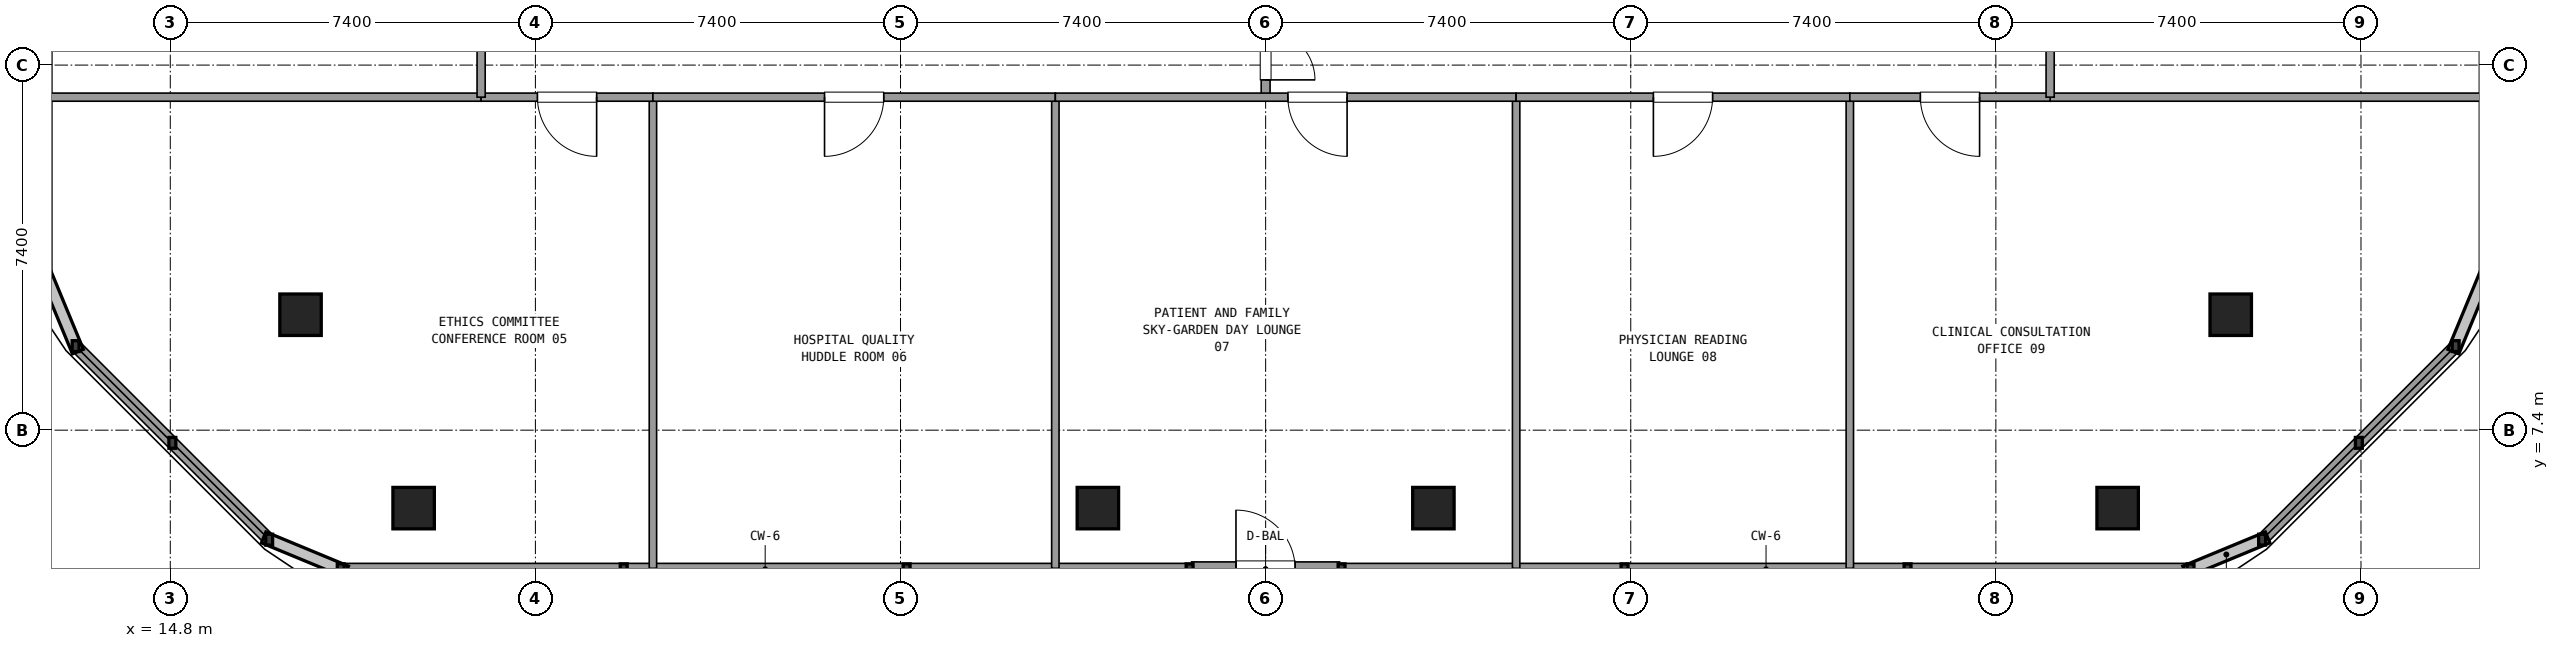
"""IFC4 building model, lengths in metres.
Left out: names, types, materials, properties, quantities, classifications, styles, units other than length and angle.
Written with IfcOpenShell. Run it as: python <this file> out.ifc"""

import sys

from ifc_helpers import new_model, si_unit, direction, frame, frame_2d, origin, origin_2d, place, context, subcontext, project, spatial, rectangle, extrude, element, fill, save


model = new_model("IFC4")
c1 = context("Model", 3, precision=1e-05, world=origin(), true_north=direction((0.0, 1.0)))
c2 = subcontext(c1, "Body", "Model", "MODEL_VIEW")
j1 = project(units=[si_unit("LENGTHUNIT", "METRE"), si_unit("PLANEANGLEUNIT", "RADIAN")], contexts=[c1])
p1 = place(None, origin())
s1 = spatial("IfcSite", under=j1, at=p1, CompositionType="ELEMENT")
p2 = place(p1, origin())
s2 = spatial("IfcBuilding", under=s1, at=p2, CompositionType="ELEMENT")
p3 = place(p2, frame((0.0, 0.0, 278.82)))
s3 = spatial("IfcBuildingStorey", under=s2, at=p3, CompositionType="ELEMENT", Elevation=278.82)
for number, where, z_axis, x_axis in (
    (1, (17.44, 9.74, 0.0), (0.0, 0.0, 1.0), (1.0, 0.0, 0.0)),
    (2, (19.732, 5.82, 0.0), (0.0, 0.0, 1.0), (1.0, 0.0, 0.0)),
    (3, (33.6, 5.82, 0.0), (0.0, 0.0, 1.0), (1.0, 0.0, 0.0)),
    (4, (40.4, 5.82, 0.0), (0.0, 0.0, 1.0), (1.0, 0.0, 0.0)),
    (5, (54.268, 5.82, 0.0), (0.0, 0.0, 1.0), (1.0, 0.0, 0.0)),
    (6, (56.56, 9.74, 0.0), (0.0, 0.0, 1.0), (1.0, 0.0, 0.0)),
):
    element("IfcColumn", number, at=place(p3, frame(where, z_axis=z_axis, x_axis=x_axis)), inside=s3, PredefinedType="COLUMN", context=c2, shape_type="SweptSolid", body=[
        extrude(rectangle(XDim=0.84, YDim=0.84, at=origin_2d()), origin(), (0.0, 0.0, 1.0), 3.6),
    ])
p4 = place(p3, frame((35.499, 4.58, 0.0), z_axis=(0.0, 0.0, 1.0), x_axis=(1.0, 0.0, 0.0)))
e7 = element("IfcWall", 7, at=p4, inside=s3, PredefinedType="SOLIDWALL", context=c2, shape_type="SweptSolid", body=[
    extrude(rectangle(XDim=3.0, YDim=0.3, at=frame_2d((1.5, 0.0))), origin(), (0.0, 0.0, 1.0), 2.69),
])
p5 = place(p4, frame((0.9, 0.0, 0.0)))
e8 = element("IfcOpeningElement", 8, at=p5, cuts=e7, PredefinedType="OPENING", context=c2, shape_type="SweptSolid", body=[
    extrude(rectangle(XDim=1.2, YDim=2.2, at=frame_2d((0.6, 1.1))), frame((0.0, 0.16, 0.0), z_axis=(0.0, -1.0, 0.0), x_axis=(1.0, 0.0, 0.0)), (0.0, 0.0, 1.0), 0.32),
])
p6 = place(p3, frame((18.255, 4.58, 0.0), z_axis=(0.0, 0.0, 1.0), x_axis=(1.0, 0.0, 0.0)))
e9 = element("IfcWall", 9, at=p6, inside=s3, PredefinedType="SOLIDWALL", context=c2, shape_type="SweptSolid", body=[
    extrude(rectangle(XDim=17.204, YDim=0.24, at=frame_2d((8.602, 0.0))), origin(), (0.0, 0.0, 1.0), 0.85),
])
p7 = place(p3, frame((38.539, 4.58, 0.0), z_axis=(0.0, 0.0, 1.0), x_axis=(1.0, 0.0, 0.0)))
e10 = element("IfcWall", 10, at=p7, inside=s3, PredefinedType="SOLIDWALL", context=c2, shape_type="SweptSolid", body=[
    extrude(rectangle(XDim=17.206, YDim=0.24, at=frame_2d((8.603, 0.0))), origin(), (0.0, 0.0, 1.0), 0.85),
])
p8 = place(p3, frame((57.196, 5.181, 0.0), z_axis=(0.0, 0.0, 1.0), x_axis=(0.707084777957, 0.707128783731, 0.0)))
e11 = element("IfcWall", 11, at=p8, inside=s3, PredefinedType="SOLIDWALL", context=c2, shape_type="SweptSolid", body=[
    extrude(rectangle(XDim=5.548, YDim=0.24, at=frame_2d((2.774, 0.0))), origin(), (0.0, 0.0, 1.0), 0.85),
])
p9 = place(p3, frame((61.72, 10.555, 0.0), z_axis=(0.0, 0.0, 1.0), x_axis=(0.0, 1.0, 0.0)))
e12 = element("IfcWall", 12, at=p9, inside=s3, PredefinedType="SOLIDWALL", context=c2, shape_type="SweptSolid", body=[
    extrude(rectangle(XDim=30.69, YDim=0.24, at=frame_2d((15.345, 0.0))), origin(), (0.0, 0.0, 1.0), 0.85),
])
p10 = place(p3, frame((12.28, 24.36, 0.0), z_axis=(0.0, 0.0, 1.0), x_axis=(0.0, -1.0, 0.0)))
e13 = element("IfcWall", 13, at=p10, inside=s3, PredefinedType="SOLIDWALL", context=c2, shape_type="SweptSolid", body=[
    extrude(rectangle(XDim=13.805, YDim=0.24, at=frame_2d((6.903, 0.0))), origin(), (0.0, 0.0, 1.0), 0.85),
])
p11 = place(p3, frame((12.881, 9.104, 0.0), z_axis=(0.0, 0.0, 1.0), x_axis=(0.707084777957, -0.707128783731, 0.0)))
e14 = element("IfcWall", 14, at=p11, inside=s3, PredefinedType="SOLIDWALL", context=c2, shape_type="SweptSolid", body=[
    extrude(rectangle(XDim=5.548, YDim=0.24, at=frame_2d((2.774, 0.0))), origin(), (0.0, 0.0, 1.0), 0.85),
])
p12 = place(p3, frame((37.0, 14.15, 0.0), z_axis=(0.0, 0.0, 1.0), x_axis=(0.0, 1.0, 0.0)))
e15 = element("IfcWall", 15, at=p12, inside=s3, PredefinedType="PARTITIONING", context=c2, shape_type="SweptSolid", body=[
    extrude(rectangle(XDim=2.7, YDim=0.18, at=frame_2d((1.35, 0.0))), origin(), (0.0, 0.0, 1.0), 2.61),
])
p13 = place(p12, frame((0.35, 0.0, 0.0)))
e16 = element("IfcOpeningElement", 16, at=p13, cuts=e15, PredefinedType="OPENING", context=c2, shape_type="SweptSolid", body=[
    extrude(rectangle(XDim=2.0, YDim=2.2, at=frame_2d((1.0, 1.1))), frame((0.0, 0.1, 0.0), z_axis=(0.0, -1.0, 0.0), x_axis=(1.0, 0.0, 0.0)), (0.0, 0.0, 1.0), 0.2),
])
for number, where, z_axis, x_axis in (
    (17, (12.3, 14.15, 0.0), (0.0, 0.0, 1.0), (1.0, 0.0, 0.0)),
    (18, (52.9, 14.15, 0.0), (0.0, 0.0, 1.0), (1.0, 0.0, 0.0)),
):
    element("IfcWall", number, at=place(p3, frame(where, z_axis=z_axis, x_axis=x_axis)), inside=s3, PredefinedType="PARTITIONING", context=c2, shape_type="SweptSolid", body=[
        extrude(rectangle(XDim=8.8, YDim=0.165, at=frame_2d((4.4, 0.0))), origin(), (0.0, 0.0, 1.0), 2.61),
    ])
p14 = place(p3, frame((24.582, 14.15, 0.0), z_axis=(0.0, 0.0, 1.0), x_axis=(0.0, -1.0, 0.0)))
e19 = element("IfcWall", 19, at=p14, inside=s3, PredefinedType="PARTITIONING", context=c2, shape_type="SweptSolid", body=[
    extrude(rectangle(XDim=9.55, YDim=0.15, at=frame_2d((4.775, 0.0))), origin(), (0.0, 0.0, 1.0), 2.61),
])
p15 = place(p3, frame((21.1, 14.15, 0.0), z_axis=(0.0, 0.0, 1.0), x_axis=(1.0, 0.0, 0.0)))
e20 = element("IfcWall", 20, at=p15, inside=s3, PredefinedType="PARTITIONING", context=c2, shape_type="SweptSolid", body=[
    extrude(rectangle(XDim=3.482, YDim=0.165, at=frame_2d((1.741, 0.0))), origin(), (0.0, 0.0, 1.0), 2.61),
])
p16 = place(p15, frame((1.141, 0.0, 0.0)))
e21 = element("IfcOpeningElement", 21, at=p16, cuts=e20, PredefinedType="OPENING", context=c2, shape_type="SweptSolid", body=[
    extrude(rectangle(XDim=1.2, YDim=2.15, at=frame_2d((0.6, 1.075))), frame((0.0, 0.093, 0.0), z_axis=(0.0, -1.0, 0.0), x_axis=(1.0, 0.0, 0.0)), (0.0, 0.0, 1.0), 0.185),
])
p17 = place(p3, frame((32.738, 14.15, 0.0), z_axis=(0.0, 0.0, 1.0), x_axis=(0.0, -1.0, 0.0)))
e22 = element("IfcWall", 22, at=p17, inside=s3, PredefinedType="PARTITIONING", context=c2, shape_type="SweptSolid", body=[
    extrude(rectangle(XDim=9.55, YDim=0.15, at=frame_2d((4.775, 0.0))), origin(), (0.0, 0.0, 1.0), 2.61),
])
p18 = place(p3, frame((24.582, 14.15, 0.0), z_axis=(0.0, 0.0, 1.0), x_axis=(1.0, 0.0, 0.0)))
e23 = element("IfcWall", 23, at=p18, inside=s3, PredefinedType="PARTITIONING", context=c2, shape_type="SweptSolid", body=[
    extrude(rectangle(XDim=8.156, YDim=0.165, at=frame_2d((4.078, 0.0))), origin(), (0.0, 0.0, 1.0), 2.61),
])
p19 = place(p18, frame((3.478, 0.0, 0.0)))
e24 = element("IfcOpeningElement", 24, at=p19, cuts=e23, PredefinedType="OPENING", context=c2, shape_type="SweptSolid", body=[
    extrude(rectangle(XDim=1.2, YDim=2.15, at=frame_2d((0.6, 1.075))), frame((0.0, 0.093, 0.0), z_axis=(0.0, -1.0, 0.0), x_axis=(1.0, 0.0, 0.0)), (0.0, 0.0, 1.0), 0.185),
])
p20 = place(p3, frame((42.077, 14.15, 0.0), z_axis=(0.0, 0.0, 1.0), x_axis=(0.0, -1.0, 0.0)))
e25 = element("IfcWall", 25, at=p20, inside=s3, PredefinedType="PARTITIONING", context=c2, shape_type="SweptSolid", body=[
    extrude(rectangle(XDim=9.55, YDim=0.15, at=frame_2d((4.775, 0.0))), origin(), (0.0, 0.0, 1.0), 2.61),
])
p21 = place(p3, frame((32.738, 14.15, 0.0), z_axis=(0.0, 0.0, 1.0), x_axis=(1.0, 0.0, 0.0)))
e26 = element("IfcWall", 26, at=p21, inside=s3, PredefinedType="PARTITIONING", context=c2, shape_type="SweptSolid", body=[
    extrude(rectangle(XDim=9.339, YDim=0.165, at=frame_2d((4.669, 0.0))), origin(), (0.0, 0.0, 1.0), 2.61),
])
p22 = place(p21, frame((4.713, 0.0, 0.0)))
e27 = element("IfcOpeningElement", 27, at=p22, cuts=e26, PredefinedType="OPENING", context=c2, shape_type="SweptSolid", body=[
    extrude(rectangle(XDim=1.2, YDim=2.15, at=frame_2d((0.6, 1.075))), frame((0.0, 0.093, 0.0), z_axis=(0.0, -1.0, 0.0), x_axis=(1.0, 0.0, 0.0)), (0.0, 0.0, 1.0), 0.185),
])
p23 = place(p3, frame((48.84, 14.15, 0.0), z_axis=(0.0, 0.0, 1.0), x_axis=(0.0, -1.0, 0.0)))
e28 = element("IfcWall", 28, at=p23, inside=s3, PredefinedType="PARTITIONING", context=c2, shape_type="SweptSolid", body=[
    extrude(rectangle(XDim=9.55, YDim=0.15, at=frame_2d((4.775, 0.0))), origin(), (0.0, 0.0, 1.0), 2.61),
])
p24 = place(p3, frame((42.077, 14.15, 0.0), z_axis=(0.0, 0.0, 1.0), x_axis=(1.0, 0.0, 0.0)))
e29 = element("IfcWall", 29, at=p24, inside=s3, PredefinedType="PARTITIONING", context=c2, shape_type="SweptSolid", body=[
    extrude(rectangle(XDim=6.763, YDim=0.165, at=frame_2d((3.382, 0.0))), origin(), (0.0, 0.0, 1.0), 2.61),
])
p25 = place(p24, frame((2.782, 0.0, 0.0)))
e30 = element("IfcOpeningElement", 30, at=p25, cuts=e29, PredefinedType="OPENING", context=c2, shape_type="SweptSolid", body=[
    extrude(rectangle(XDim=1.2, YDim=2.15, at=frame_2d((0.6, 1.075))), frame((0.0, 0.093, 0.0), z_axis=(0.0, -1.0, 0.0), x_axis=(1.0, 0.0, 0.0)), (0.0, 0.0, 1.0), 0.185),
])
p26 = place(p3, frame((48.84, 14.15, 0.0), z_axis=(0.0, 0.0, 1.0), x_axis=(1.0, 0.0, 0.0)))
e31 = element("IfcWall", 31, at=p26, inside=s3, PredefinedType="PARTITIONING", context=c2, shape_type="SweptSolid", body=[
    extrude(rectangle(XDim=4.06, YDim=0.165, at=frame_2d((2.03, 0.0))), origin(), (0.0, 0.0, 1.0), 2.61),
])
p27 = place(p26, frame((1.43, 0.0, 0.0)))
e32 = element("IfcOpeningElement", 32, at=p27, cuts=e31, PredefinedType="OPENING", context=c2, shape_type="SweptSolid", body=[
    extrude(rectangle(XDim=1.2, YDim=2.15, at=frame_2d((0.6, 1.075))), frame((0.0, 0.093, 0.0), z_axis=(0.0, -1.0, 0.0), x_axis=(1.0, 0.0, 0.0)), (0.0, 0.0, 1.0), 0.185),
])
p28 = place(p3, frame((21.1, 14.15, 0.0), z_axis=(0.0, 0.0, 1.0), x_axis=(0.0, 1.0, 0.0)))
e33 = element("IfcWall", 33, at=p28, inside=s3, PredefinedType="PARTITIONING", context=c2, shape_type="SweptSolid", body=[
    extrude(rectangle(XDim=9.95, YDim=0.165, at=frame_2d((4.975, 0.0))), origin(), (0.0, 0.0, 1.0), 2.61),
])
p29 = place(p28, frame((4.375, 0.0, 0.0)))
e34 = element("IfcOpeningElement", 34, at=p29, cuts=e33, PredefinedType="OPENING", context=c2, shape_type="SweptSolid", body=[
    extrude(rectangle(XDim=1.2, YDim=2.15, at=frame_2d((0.6, 1.075))), frame((0.0, 0.093, 0.0), z_axis=(0.0, -1.0, 0.0), x_axis=(1.0, 0.0, 0.0)), (0.0, 0.0, 1.0), 0.185),
])
p30 = place(p3, frame((52.9, 14.15, 0.0), z_axis=(0.0, 0.0, 1.0), x_axis=(0.0, 1.0, 0.0)))
e35 = element("IfcWall", 35, at=p30, inside=s3, PredefinedType="PARTITIONING", context=c2, shape_type="SweptSolid", body=[
    extrude(rectangle(XDim=5.405, YDim=0.165, at=frame_2d((2.703, 0.0))), origin(), (0.0, 0.0, 1.0), 2.61),
])
p31 = place(p30, frame((2.102, 0.0, 0.0)))
e36 = element("IfcOpeningElement", 36, at=p31, cuts=e35, PredefinedType="OPENING", context=c2, shape_type="SweptSolid", body=[
    extrude(rectangle(XDim=1.2, YDim=2.15, at=frame_2d((0.6, 1.075))), frame((0.0, 0.093, 0.0), z_axis=(0.0, -1.0, 0.0), x_axis=(1.0, 0.0, 0.0)), (0.0, 0.0, 1.0), 0.185),
])
p32 = place(p13, frame((2.0, 0.0, 0.0), z_axis=(0.0, 0.0, 1.0), x_axis=(-1.0, 0.0, 0.0)))
e37 = element("IfcDoor", 37, at=p32, inside=s3, OperationType="DOUBLE_DOOR_SINGLE_SWING", PredefinedType="DOOR", context=c2, shape_type="SweptSolid", body=[
    extrude(rectangle(XDim=2.0, YDim=2.2, at=frame_2d((1.0, 1.1))), frame((0.0, 0.025, 0.0), z_axis=(0.0, -1.0, 0.0), x_axis=(1.0, 0.0, 0.0)), (0.0, 0.0, 1.0), 0.05),
])
fill(e16, e37)
p33 = place(p16, frame((1.2, 0.0, 0.0), z_axis=(0.0, 0.0, 1.0), x_axis=(-1.0, 0.0, 0.0)))
e38 = element("IfcDoor", 38, at=p33, inside=s3, OperationType="SINGLE_SWING_RIGHT", PredefinedType="DOOR", context=c2, shape_type="SweptSolid", body=[
    extrude(rectangle(XDim=1.2, YDim=2.15, at=frame_2d((0.6, 1.075))), frame((0.0, 0.025, 0.0), z_axis=(0.0, -1.0, 0.0), x_axis=(1.0, 0.0, 0.0)), (0.0, 0.0, 1.0), 0.05),
])
fill(e21, e38)
p34 = place(p19, frame((1.2, 0.0, 0.0), z_axis=(0.0, 0.0, 1.0), x_axis=(-1.0, 0.0, 0.0)))
e39 = element("IfcDoor", 39, at=p34, inside=s3, OperationType="SINGLE_SWING_LEFT", PredefinedType="DOOR", context=c2, shape_type="SweptSolid", body=[
    extrude(rectangle(XDim=1.2, YDim=2.15, at=frame_2d((0.6, 1.075))), frame((0.0, 0.025, 0.0), z_axis=(0.0, -1.0, 0.0), x_axis=(1.0, 0.0, 0.0)), (0.0, 0.0, 1.0), 0.05),
])
fill(e24, e39)
p35 = place(p22, frame((1.2, 0.0, 0.0), z_axis=(0.0, 0.0, 1.0), x_axis=(-1.0, 0.0, 0.0)))
e40 = element("IfcDoor", 40, at=p35, inside=s3, OperationType="SINGLE_SWING_RIGHT", PredefinedType="DOOR", context=c2, shape_type="SweptSolid", body=[
    extrude(rectangle(XDim=1.2, YDim=2.15, at=frame_2d((0.6, 1.075))), frame((0.0, 0.025, 0.0), z_axis=(0.0, -1.0, 0.0), x_axis=(1.0, 0.0, 0.0)), (0.0, 0.0, 1.0), 0.05),
])
fill(e27, e40)
p36 = place(p25, frame((1.2, 0.0, 0.0), z_axis=(0.0, 0.0, 1.0), x_axis=(-1.0, 0.0, 0.0)))
e41 = element("IfcDoor", 41, at=p36, inside=s3, OperationType="SINGLE_SWING_LEFT", PredefinedType="DOOR", context=c2, shape_type="SweptSolid", body=[
    extrude(rectangle(XDim=1.2, YDim=2.15, at=frame_2d((0.6, 1.075))), frame((0.0, 0.025, 0.0), z_axis=(0.0, -1.0, 0.0), x_axis=(1.0, 0.0, 0.0)), (0.0, 0.0, 1.0), 0.05),
])
fill(e30, e41)
p37 = place(p27, frame((1.2, 0.0, 0.0), z_axis=(0.0, 0.0, 1.0), x_axis=(-1.0, 0.0, 0.0)))
e42 = element("IfcDoor", 42, at=p37, inside=s3, OperationType="SINGLE_SWING_RIGHT", PredefinedType="DOOR", context=c2, shape_type="SweptSolid", body=[
    extrude(rectangle(XDim=1.2, YDim=2.15, at=frame_2d((0.6, 1.075))), frame((0.0, 0.025, 0.0), z_axis=(0.0, -1.0, 0.0), x_axis=(1.0, 0.0, 0.0)), (0.0, 0.0, 1.0), 0.05),
])
fill(e32, e42)
save(model, sys.argv[1])
